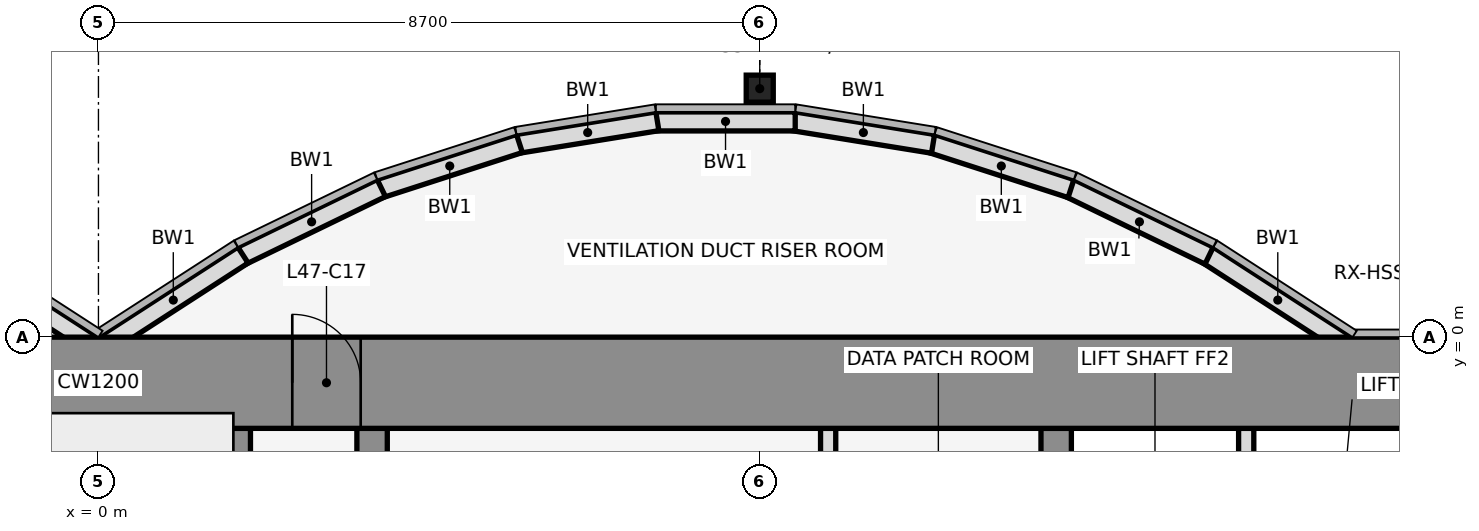
"""IFC4 building model, lengths in metres.
Left out: names, types, materials, properties, quantities, classifications, styles, units other than length and angle.
Written with IfcOpenShell. Run it as: python <this file> out.ifc"""

import sys

from ifc_helpers import new_model, si_unit, direction, frame, frame_2d, origin, origin_2d, place, context, subcontext, project, spatial, rectangle, hollow_rectangle, extrude, element, fill, save


model = new_model("IFC4")
c1 = context("Model", 3, precision=1e-05, world=origin(), true_north=direction((0.0, 1.0)))
c2 = subcontext(c1, "Body", "Model", "MODEL_VIEW")
j1 = project(units=[si_unit("LENGTHUNIT", "METRE"), si_unit("PLANEANGLEUNIT", "RADIAN")], contexts=[c1])
p1 = place(None, origin())
s1 = spatial("IfcSite", under=j1, at=p1, CompositionType="ELEMENT")
p2 = place(p1, origin())
s2 = spatial("IfcBuilding", under=s1, at=p2, CompositionType="ELEMENT")
p3 = place(p2, frame((0.0, 0.0, 211.4)))
s3 = spatial("IfcBuildingStorey", under=s2, at=p3, CompositionType="ELEMENT", Elevation=211.4)
p4 = place(p3, frame((8.7, 3.269, 0.0), z_axis=(0.0, 0.0, 1.0), x_axis=(1.0, 0.0, 0.0)))
e1 = element("IfcColumn", 1, at=p4, inside=s3, PredefinedType="COLUMN", context=c2, shape_type="SweptSolid", body=[
    extrude(hollow_rectangle(XDim=0.356, YDim=0.356, WallThickness=0.012, at=origin_2d()), origin(), (0.0, 0.0, 1.0), 4.1),
])
p5 = place(p3, frame((16.432, -0.105, 0.0), z_axis=(0.0, 0.0, 1.0), x_axis=(-0.83981312244, 0.542875602121, 0.0)))
e2 = element("IfcWall", 2, at=p5, inside=s3, PredefinedType="STANDARD", context=c2, shape_type="SweptSolid", body=[
    extrude(rectangle(XDim=2.183, YDim=0.25, at=frame_2d((1.091, 0.0))), origin(), (0.0, 0.0, 1.0), 3.95),
])
p6 = place(p3, frame((14.612, 1.073, 0.0), z_axis=(0.0, 0.0, 1.0), x_axis=(-0.89982408427, 0.436252928206, 0.0)))
e3 = element("IfcWall", 3, at=p6, inside=s3, PredefinedType="STANDARD", context=c2, shape_type="SweptSolid", body=[
    extrude(rectangle(XDim=2.038, YDim=0.25, at=frame_2d((1.019, 0.0))), origin(), (0.0, 0.0, 1.0), 3.95),
])
p7 = place(p3, frame((12.795, 1.955, 0.0), z_axis=(0.0, 0.0, 1.0), x_axis=(-0.951495806175, 0.307661714928, 0.0)))
e4 = element("IfcWall", 4, at=p7, inside=s3, PredefinedType="STANDARD", context=c2, shape_type="SweptSolid", body=[
    extrude(rectangle(XDim=1.927, YDim=0.25, at=frame_2d((0.963, 0.0))), origin(), (0.0, 0.0, 1.0), 3.95),
])
p8 = place(p3, frame((10.98, 2.543, 0.0), z_axis=(0.0, 0.0, 1.0), x_axis=(-0.987181718931, 0.159600293885, 0.0)))
e5 = element("IfcWall", 5, at=p8, inside=s3, PredefinedType="STANDARD", context=c2, shape_type="SweptSolid", body=[
    extrude(rectangle(XDim=1.857, YDim=0.25, at=frame_2d((0.929, 0.0))), origin(), (0.0, 0.0, 1.0), 3.95),
])
p9 = place(p3, frame((9.167, 2.838, 0.0), z_axis=(0.0, 0.0, 1.0), x_axis=(-1.0, 0.0, 0.0)))
e6 = element("IfcWall", 6, at=p9, inside=s3, PredefinedType="STANDARD", context=c2, shape_type="SweptSolid", body=[
    extrude(rectangle(XDim=1.833, YDim=0.25, at=frame_2d((0.917, 0.0))), origin(), (0.0, 0.0, 1.0), 3.95),
])
p10 = place(p3, frame((7.353, 2.84, 0.0), z_axis=(0.0, 0.0, 1.0), x_axis=(-0.987181718931, -0.159600293885, 0.0)))
e7 = element("IfcWall", 7, at=p10, inside=s3, PredefinedType="STANDARD", context=c2, shape_type="SweptSolid", body=[
    extrude(rectangle(XDim=1.857, YDim=0.25, at=frame_2d((0.929, 0.0))), origin(), (0.0, 0.0, 1.0), 3.95),
])
p11 = place(p3, frame((5.538, 2.548, 0.0), z_axis=(0.0, 0.0, 1.0), x_axis=(-0.951495806175, -0.307661714928, 0.0)))
e8 = element("IfcWall", 8, at=p11, inside=s3, PredefinedType="STANDARD", context=c2, shape_type="SweptSolid", body=[
    extrude(rectangle(XDim=1.927, YDim=0.25, at=frame_2d((0.963, 0.0))), origin(), (0.0, 0.0, 1.0), 3.95),
])
p12 = place(p3, frame((3.721, 1.962, 0.0), z_axis=(0.0, 0.0, 1.0), x_axis=(-0.89982408427, -0.436252928206, 0.0)))
e9 = element("IfcWall", 9, at=p12, inside=s3, PredefinedType="STANDARD", context=c2, shape_type="SweptSolid", body=[
    extrude(rectangle(XDim=2.038, YDim=0.25, at=frame_2d((1.019, 0.0))), origin(), (0.0, 0.0, 1.0), 3.95),
])
for number, where, z_axis, x_axis in (
    (10, (1.901, 1.08, 0.0), (0.0, 0.0, 1.0), (-0.84, -0.543, 0.0)),
    (11, (-0.068, -0.105, 0.0), (0.0, 0.0, 1.0), (-0.84, 0.543, 0.0)),
):
    element("IfcWall", number, at=place(p3, frame(where, z_axis=z_axis, x_axis=x_axis)), inside=s3, PredefinedType="STANDARD", context=c2, shape_type="SweptSolid", body=[
        extrude(rectangle(XDim=2.183, YDim=0.25, at=frame_2d((1.091, 0.0))), origin(), (0.0, 0.0, 1.0), 3.95),
    ])
p13 = place(p3, frame((1.8, -11.8, 0.0), z_axis=(0.0, 0.0, 1.0), x_axis=(0.0, 1.0, 0.0)))
e12 = element("IfcWall", 12, at=p13, inside=s3, PredefinedType="SHEAR", context=c2, shape_type="SweptSolid", body=[
    extrude(rectangle(XDim=10.6, YDim=0.4, at=frame_2d((5.3, 0.0))), origin(), (0.0, 0.0, 1.0), 4.1),
])
p14 = place(p3, frame((3.6, -11.8, 0.0), z_axis=(0.0, 0.0, 1.0), x_axis=(0.0, 1.0, 0.0)))
e13 = element("IfcWall", 13, at=p14, inside=s3, PredefinedType="SHEAR", context=c2, shape_type="SweptSolid", body=[
    extrude(rectangle(XDim=10.6, YDim=0.4, at=frame_2d((5.3, 0.0))), origin(), (0.0, 0.0, 1.0), 4.1),
])
p15 = place(p14, frame((1.35, 0.0, 0.0)))
e14 = element("IfcOpeningElement", 14, at=p15, cuts=e13, PredefinedType="OPENING", context=c2, shape_type="SweptSolid", body=[
    extrude(rectangle(XDim=0.9, YDim=2.1, at=frame_2d((0.45, 1.05))), frame((0.0, 0.212, 0.0), z_axis=(0.0, -1.0, 0.0), x_axis=(1.0, 0.0, 0.0)), (0.0, 0.0, 1.0), 0.424),
])
p16 = place(p3, frame((9.6, -4.6, 0.0), z_axis=(0.0, 0.0, 1.0), x_axis=(0.0, 1.0, 0.0)))
e15 = element("IfcWall", 15, at=p16, inside=s3, PredefinedType="PARTITIONING", context=c2, shape_type="SweptSolid", body=[
    extrude(rectangle(XDim=3.4, YDim=0.2, at=frame_2d((1.7, 0.0))), origin(), (0.0, 0.0, 1.0), 2.841),
])
p17 = place(p3, frame((12.6, -11.8, 0.0), z_axis=(0.0, 0.0, 1.0), x_axis=(0.0, 1.0, 0.0)))
e16 = element("IfcWall", 16, at=p17, inside=s3, PredefinedType="SHEAR", context=c2, shape_type="SweptSolid", body=[
    extrude(rectangle(XDim=10.6, YDim=0.4, at=frame_2d((5.3, 0.0))), origin(), (0.0, 0.0, 1.0), 4.1),
])
p18 = place(p17, frame((1.25, 0.0, 0.0)))
e17 = element("IfcOpeningElement", 17, at=p18, cuts=e16, PredefinedType="OPENING", context=c2, shape_type="SweptSolid", body=[
    extrude(rectangle(XDim=1.2, YDim=2.1, at=frame_2d((0.6, 1.05))), frame((0.0, 0.212, 0.0), z_axis=(0.0, -1.0, 0.0), x_axis=(1.0, 0.0, 0.0)), (0.0, 0.0, 1.0), 0.424),
])
p19 = place(p17, frame((4.75, 0.0, 0.0)))
e18 = element("IfcOpeningElement", 18, at=p19, cuts=e16, PredefinedType="OPENING", context=c2, shape_type="SweptSolid", body=[
    extrude(rectangle(XDim=1.1, YDim=2.1, at=frame_2d((0.55, 1.05))), frame((0.0, 0.212, 0.0), z_axis=(0.0, -1.0, 0.0), x_axis=(1.0, 0.0, 0.0)), (0.0, 0.0, 1.0), 0.424),
])
p20 = place(p3, frame((15.1, -4.6, 0.0), z_axis=(0.0, 0.0, 1.0), x_axis=(0.0, 1.0, 0.0)))
e19 = element("IfcWall", 19, at=p20, inside=s3, PredefinedType="PARTITIONING", context=c2, shape_type="SweptSolid", body=[
    extrude(rectangle(XDim=3.4, YDim=0.2, at=frame_2d((1.7, 0.0))), origin(), (0.0, 0.0, 1.0), 2.841),
])
p21 = place(p3, frame((-22.0, -0.6, 0.0), z_axis=(0.0, 0.0, 1.0), x_axis=(1.0, 0.0, 0.0)))
e20 = element("IfcWall", 20, at=p21, inside=s3, PredefinedType="SHEAR", context=c2, shape_type="SweptSolid", body=[
    extrude(rectangle(XDim=44.0, YDim=1.2, at=frame_2d((22.0, 0.0))), origin(), (0.0, 0.0, 1.0), 4.1),
])
p22 = place(p21, frame((18.55, 0.0, 0.0)))
e21 = element("IfcOpeningElement", 21, at=p22, cuts=e20, PredefinedType="OPENING", context=c2, shape_type="SweptSolid", body=[
    extrude(rectangle(XDim=0.9, YDim=2.1, at=frame_2d((0.45, 1.05))), frame((0.0, 0.612, 0.0), z_axis=(0.0, -1.0, 0.0), x_axis=(1.0, 0.0, 0.0)), (0.0, 0.0, 1.0), 1.224),
])
p23 = place(p21, frame((24.55, 0.0, 0.0)))
e22 = element("IfcOpeningElement", 22, at=p23, cuts=e20, PredefinedType="OPENING", context=c2, shape_type="SweptSolid", body=[
    extrude(rectangle(XDim=0.9, YDim=2.1, at=frame_2d((0.45, 1.05))), frame((0.0, 0.612, 0.0), z_axis=(0.0, -1.0, 0.0), x_axis=(1.0, 0.0, 0.0)), (0.0, 0.0, 1.0), 1.224),
])
p24 = place(p23, origin())
e23 = element("IfcDoor", 23, at=p24, inside=s3, OperationType="SINGLE_SWING_LEFT", PredefinedType="DOOR", context=c2, shape_type="SweptSolid", body=[
    extrude(rectangle(XDim=0.9, YDim=2.1, at=frame_2d((0.45, 1.05))), frame((0.0, 0.025, 0.0), z_axis=(0.0, -1.0, 0.0), x_axis=(1.0, 0.0, 0.0)), (0.0, 0.0, 1.0), 0.05),
])
fill(e22, e23)
save(model, sys.argv[1])
